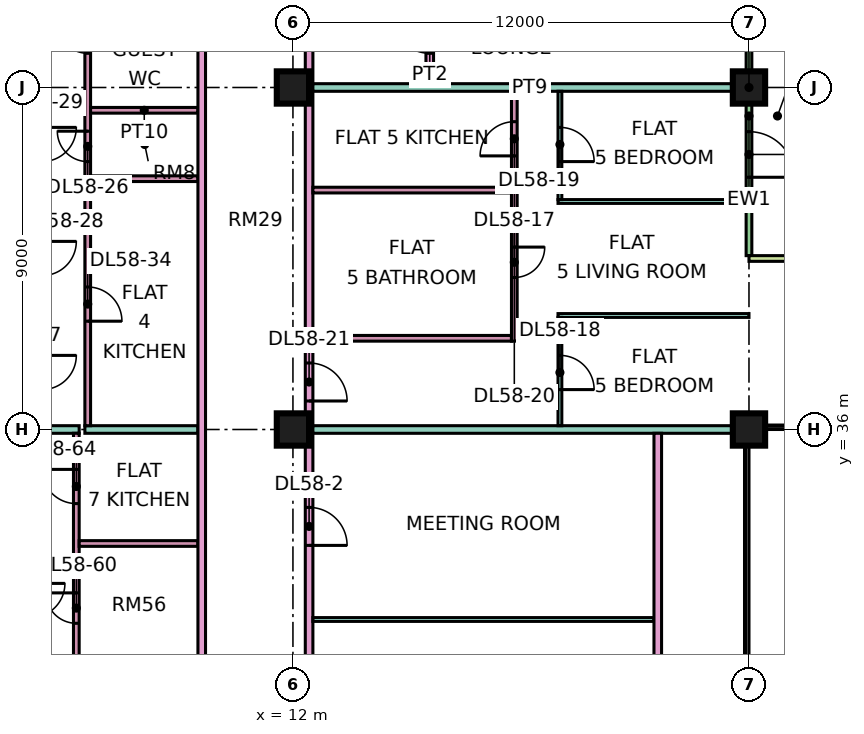
"""IFC4 building model, lengths in metres.
Left out: names, types, materials, properties, quantities, classifications, styles, units other than length and angle.
Written with IfcOpenShell. Run it as: python <this file> out.ifc"""

import sys

from ifc_helpers import new_model, si_unit, direction, frame, frame_2d, origin, origin_2d, place, context, subcontext, project, spatial, rectangle, extrude, element, fill, save


model = new_model("IFC4")
c1 = context("Model", 3, precision=1e-05, world=origin(), true_north=direction((0.0, 1.0)))
c2 = subcontext(c1, "Body", "Model", "MODEL_VIEW")
j1 = project(units=[si_unit("LENGTHUNIT", "METRE"), si_unit("PLANEANGLEUNIT", "RADIAN")], contexts=[c1])
p1 = place(None, origin())
s1 = spatial("IfcSite", under=j1, at=p1, CompositionType="ELEMENT")
p2 = place(p1, origin())
s2 = spatial("IfcBuilding", under=s1, at=p2, CompositionType="ELEMENT")
p3 = place(p2, frame((0.0, 0.0, 245.4)))
s3 = spatial("IfcBuildingStorey", under=s2, at=p3, CompositionType="ELEMENT", Elevation=245.4)
for number, where, z_axis, x_axis in (
    (1, (12.0, 36.0, 0.0), (0.0, 0.0, 1.0), (1.0, 0.0, 0.0)),
    (2, (12.0, 45.0, 0.0), (0.0, 0.0, 1.0), (1.0, 0.0, 0.0)),
    (3, (24.0, 36.0, 0.0), (0.0, 0.0, 1.0), (1.0, 0.0, 0.0)),
    (4, (24.0, 45.0, 0.0), (0.0, 0.0, 1.0), (1.0, 0.0, 0.0)),
):
    element("IfcColumn", number, at=place(p3, frame(where, z_axis=z_axis, x_axis=x_axis)), inside=s3, PredefinedType="COLUMN", context=c2, shape_type="SweptSolid", body=[
        extrude(rectangle(XDim=0.85, YDim=0.85, at=origin_2d()), origin(), (0.0, 0.0, 1.0), 3.75),
    ])
p4 = place(p3, frame((24.0, 40.575, 0.0), z_axis=(0.0, 0.0, 1.0), x_axis=(0.0, 1.0, 0.0)))
e5 = element("IfcWall", 5, at=p4, inside=s3, PredefinedType="SOLIDWALL", context=c2, shape_type="SweptSolid", body=[
    extrude(rectangle(XDim=7.35, YDim=0.15, at=frame_2d((3.675, 0.0))), origin(), (0.0, 0.0, 1.0), 3.35),
])
p5 = place(p4, frame((2.062, 0.0, 0.0)))
e6 = element("IfcOpeningElement", 6, at=p5, cuts=e5, PredefinedType="OPENING", context=c2, shape_type="SweptSolid", body=[
    extrude(rectangle(XDim=1.2, YDim=2.4, at=frame_2d((0.6, 1.2))), frame((0.0, 0.085, 0.0), z_axis=(0.0, -1.0, 0.0), x_axis=(1.0, 0.0, 0.0)), (0.0, 0.0, 1.0), 0.17),
])
p6 = place(p4, frame((5.55, 0.0, 0.45)))
e7 = element("IfcOpeningElement", 7, at=p6, cuts=e5, PredefinedType="OPENING", context=c2, shape_type="SweptSolid", body=[
    extrude(rectangle(XDim=1.2, YDim=2.4, at=frame_2d((0.6, 1.2))), frame((0.0, 0.085, 0.0), z_axis=(0.0, -1.0, 0.0), x_axis=(1.0, 0.0, 0.0)), (0.0, 0.0, 1.0), 0.17),
])
p7 = place(p3, frame((25.5, 40.5, 0.0), z_axis=(0.0, 0.0, 1.0), x_axis=(-1.0, 0.0, 0.0)))
e8 = element("IfcWall", 8, at=p7, inside=s3, PredefinedType="SOLIDWALL", context=c2, shape_type="SweptSolid", body=[
    extrude(rectangle(XDim=1.5, YDim=0.15, at=frame_2d((0.75, 0.0))), origin(), (0.0, 0.0, 1.0), 3.35),
])
p8 = place(p3, frame((0.0, 36.0, 0.0), z_axis=(0.0, 0.0, 1.0), x_axis=(1.0, 0.0, 0.0)))
e9 = element("IfcWall", 9, at=p8, inside=s3, PredefinedType="PARTITIONING", context=c2, shape_type="SweptSolid", body=[
    extrude(rectangle(XDim=6.375, YDim=0.2, at=frame_2d((3.188, 0.0))), origin(), (0.0, 0.0, 1.0), 3.35),
])
p9 = place(p3, frame((6.3, 26.325, 0.0), z_axis=(0.0, 0.0, 1.0), x_axis=(0.0, 1.0, 0.0)))
e10 = element("IfcWall", 10, at=p9, inside=s3, PredefinedType="PARTITIONING", context=c2, shape_type="SweptSolid", body=[
    extrude(rectangle(XDim=9.575, YDim=0.15, at=frame_2d((4.788, 0.0))), origin(), (0.0, 0.0, 1.0), 3.35),
])
p10 = place(p9, frame((4.575, 0.0, 0.0)))
e11 = element("IfcOpeningElement", 11, at=p10, cuts=e10, PredefinedType="OPENING", context=c2, shape_type="SweptSolid", body=[
    extrude(rectangle(XDim=0.8, YDim=2.1, at=frame_2d((0.4, 1.05))), frame((0.0, 0.085, 0.0), z_axis=(0.0, -1.0, 0.0), x_axis=(1.0, 0.0, 0.0)), (0.0, 0.0, 1.0), 0.17),
])
p11 = place(p9, frame((7.725, 0.0, 0.0)))
e12 = element("IfcOpeningElement", 12, at=p11, cuts=e10, PredefinedType="OPENING", context=c2, shape_type="SweptSolid", body=[
    extrude(rectangle(XDim=0.9, YDim=2.1, at=frame_2d((0.45, 1.05))), frame((0.0, 0.085, 0.0), z_axis=(0.0, -1.0, 0.0), x_axis=(1.0, 0.0, 0.0)), (0.0, 0.0, 1.0), 0.17),
])
p12 = place(p3, frame((6.375, 33.0, 0.0), z_axis=(0.0, 0.0, 1.0), x_axis=(1.0, 0.0, 0.0)))
e13 = element("IfcWall", 13, at=p12, inside=s3, PredefinedType="PARTITIONING", context=c2, shape_type="SweptSolid", body=[
    extrude(rectangle(XDim=3.125, YDim=0.15, at=frame_2d((1.562, 0.0))), origin(), (0.0, 0.0, 1.0), 3.35),
])
p13 = place(p3, frame((6.525, 36.0, 0.0), z_axis=(0.0, 0.0, 1.0), x_axis=(1.0, 0.0, 0.0)))
e14 = element("IfcWall", 14, at=p13, inside=s3, PredefinedType="PARTITIONING", context=c2, shape_type="SweptSolid", body=[
    extrude(rectangle(XDim=2.975, YDim=0.2, at=frame_2d((1.488, 0.0))), origin(), (0.0, 0.0, 1.0), 3.35),
])
p14 = place(p3, frame((6.6, 36.1, 0.0), z_axis=(0.0, 0.0, 1.0), x_axis=(0.0, 1.0, 0.0)))
e15 = element("IfcWall", 15, at=p14, inside=s3, PredefinedType="PARTITIONING", context=c2, shape_type="SweptSolid", body=[
    extrude(rectangle(XDim=12.275, YDim=0.15, at=frame_2d((6.137, 0.0))), origin(), (0.0, 0.0, 1.0), 3.35),
])
p15 = place(p14, frame((6.95, 0.0, 0.0)))
e16 = element("IfcOpeningElement", 16, at=p15, cuts=e15, PredefinedType="OPENING", context=c2, shape_type="SweptSolid", body=[
    extrude(rectangle(XDim=0.8, YDim=2.1, at=frame_2d((0.4, 1.05))), frame((0.0, 0.085, 0.0), z_axis=(0.0, -1.0, 0.0), x_axis=(1.0, 0.0, 0.0)), (0.0, 0.0, 1.0), 0.17),
])
p16 = place(p14, frame((2.75, 0.0, 0.0)))
e17 = element("IfcOpeningElement", 17, at=p16, cuts=e15, PredefinedType="OPENING", context=c2, shape_type="SweptSolid", body=[
    extrude(rectangle(XDim=0.9, YDim=2.1, at=frame_2d((0.45, 1.05))), frame((0.0, 0.085, 0.0), z_axis=(0.0, -1.0, 0.0), x_axis=(1.0, 0.0, 0.0)), (0.0, 0.0, 1.0), 0.17),
])
p17 = place(p14, frame((9.8, 0.0, 0.0)))
e18 = element("IfcOpeningElement", 18, at=p17, cuts=e15, PredefinedType="OPENING", context=c2, shape_type="SweptSolid", body=[
    extrude(rectangle(XDim=0.8, YDim=2.1, at=frame_2d((0.4, 1.05))), frame((0.0, 0.085, 0.0), z_axis=(0.0, -1.0, 0.0), x_axis=(1.0, 0.0, 0.0)), (0.0, 0.0, 1.0), 0.17),
])
for number, where, z_axis, x_axis in (
    (19, (6.675, 42.6, 0.0), (0.0, 0.0, 1.0), (1.0, 0.0, 0.0)),
    (20, (6.675, 44.4, 0.0), (0.0, 0.0, 1.0), (1.0, 0.0, 0.0)),
):
    element("IfcWall", number, at=place(p3, frame(where, z_axis=z_axis, x_axis=x_axis)), inside=s3, PredefinedType="PARTITIONING", context=c2, shape_type="SweptSolid", body=[
        extrude(rectangle(XDim=2.825, YDim=0.15, at=frame_2d((1.413, 0.0))), origin(), (0.0, 0.0, 1.0), 3.35),
    ])
p18 = place(p3, frame((9.6, 20.0, 0.0), z_axis=(0.0, 0.0, 1.0), x_axis=(0.0, 1.0, 0.0)))
e21 = element("IfcWall", 21, at=p18, inside=s3, PredefinedType="PARTITIONING", context=c2, shape_type="SweptSolid", body=[
    extrude(rectangle(XDim=44.35, YDim=0.2, at=frame_2d((22.175, 0.0))), origin(), (0.0, 0.0, 1.0), 3.35),
])
p19 = place(p18, frame((28.8, 0.0, 0.0)))
e22 = element("IfcOpeningElement", 22, at=p19, cuts=e21, PredefinedType="OPENING", context=c2, shape_type="SweptSolid", body=[
    extrude(rectangle(XDim=1.0, YDim=2.1, at=frame_2d((0.5, 1.05))), frame((0.0, 0.11, 0.0), z_axis=(0.0, -1.0, 0.0), x_axis=(1.0, 0.0, 0.0)), (0.0, 0.0, 1.0), 0.22),
])
p20 = place(p18, frame((0.6, 0.0, 0.0)))
e23 = element("IfcOpeningElement", 23, at=p20, cuts=e21, PredefinedType="OPENING", context=c2, shape_type="SweptSolid", body=[
    extrude(rectangle(XDim=1.2, YDim=2.1, at=frame_2d((0.6, 1.05))), frame((0.0, 0.11, 0.0), z_axis=(0.0, -1.0, 0.0), x_axis=(1.0, 0.0, 0.0)), (0.0, 0.0, 1.0), 0.22),
])
p21 = place(p18, frame((3.9, 0.0, 0.0)))
e24 = element("IfcOpeningElement", 24, at=p21, cuts=e21, PredefinedType="OPENING", context=c2, shape_type="SweptSolid", body=[
    extrude(rectangle(XDim=1.0, YDim=2.1, at=frame_2d((0.5, 1.05))), frame((0.0, 0.11, 0.0), z_axis=(0.0, -1.0, 0.0), x_axis=(1.0, 0.0, 0.0)), (0.0, 0.0, 1.0), 0.22),
])
p22 = place(p3, frame((12.425, 20.0, 0.0), z_axis=(0.0, 0.0, 1.0), x_axis=(0.0, 1.0, 0.0)))
e25 = element("IfcWall", 25, at=p22, inside=s3, PredefinedType="PARTITIONING", context=c2, shape_type="SweptSolid", body=[
    extrude(rectangle(XDim=42.926, YDim=0.2, at=frame_2d((21.463, 0.0))), origin(), (0.0, 0.0, 1.0), 3.35),
])
p23 = place(p22, frame((7.0, 0.0, 0.0)))
e26 = element("IfcOpeningElement", 26, at=p23, cuts=e25, PredefinedType="OPENING", context=c2, shape_type="SweptSolid", body=[
    extrude(rectangle(XDim=1.0, YDim=2.1, at=frame_2d((0.5, 1.05))), frame((0.0, 0.11, 0.0), z_axis=(0.0, -1.0, 0.0), x_axis=(1.0, 0.0, 0.0)), (0.0, 0.0, 1.0), 0.22),
])
p24 = place(p22, frame((12.95, 0.0, 0.0)))
e27 = element("IfcOpeningElement", 27, at=p24, cuts=e25, PredefinedType="OPENING", context=c2, shape_type="SweptSolid", body=[
    extrude(rectangle(XDim=1.0, YDim=2.1, at=frame_2d((0.5, 1.05))), frame((0.0, 0.11, 0.0), z_axis=(0.0, -1.0, 0.0), x_axis=(1.0, 0.0, 0.0)), (0.0, 0.0, 1.0), 0.22),
])
p25 = place(p22, frame((16.75, 0.0, 0.0)))
e28 = element("IfcOpeningElement", 28, at=p25, cuts=e25, PredefinedType="OPENING", context=c2, shape_type="SweptSolid", body=[
    extrude(rectangle(XDim=1.0, YDim=2.1, at=frame_2d((0.5, 1.05))), frame((0.0, 0.11, 0.0), z_axis=(0.0, -1.0, 0.0), x_axis=(1.0, 0.0, 0.0)), (0.0, 0.0, 1.0), 0.22),
])
p26 = place(p22, frame((34.9, 0.0, 0.0)))
e29 = element("IfcOpeningElement", 29, at=p26, cuts=e25, PredefinedType="OPENING", context=c2, shape_type="SweptSolid", body=[
    extrude(rectangle(XDim=1.0, YDim=2.1, at=frame_2d((0.5, 1.05))), frame((0.0, 0.11, 0.0), z_axis=(0.0, -1.0, 0.0), x_axis=(1.0, 0.0, 0.0)), (0.0, 0.0, 1.0), 0.22),
])
p27 = place(p22, frame((1.15, 0.0, 0.0)))
e30 = element("IfcOpeningElement", 30, at=p27, cuts=e25, PredefinedType="OPENING", context=c2, shape_type="SweptSolid", body=[
    extrude(rectangle(XDim=1.8, YDim=2.1, at=frame_2d((0.9, 1.05))), frame((0.0, 0.11, 0.0), z_axis=(0.0, -1.0, 0.0), x_axis=(1.0, 0.0, 0.0)), (0.0, 0.0, 1.0), 0.22),
])
p28 = place(p22, frame((28.6, 0.0, 0.0)))
e31 = element("IfcOpeningElement", 31, at=p28, cuts=e25, PredefinedType="OPENING", context=c2, shape_type="SweptSolid", body=[
    extrude(rectangle(XDim=1.8, YDim=2.1, at=frame_2d((0.9, 1.05))), frame((0.0, 0.11, 0.0), z_axis=(0.0, -1.0, 0.0), x_axis=(1.0, 0.0, 0.0)), (0.0, 0.0, 1.0), 0.22),
])
p29 = place(p3, frame((12.525, 31.0, 0.0), z_axis=(0.0, 0.0, 1.0), x_axis=(1.0, 0.0, 0.0)))
e32 = element("IfcWall", 32, at=p29, inside=s3, PredefinedType="PARTITIONING", context=c2, shape_type="SweptSolid", body=[
    extrude(rectangle(XDim=8.975, YDim=0.1, at=frame_2d((4.488, 0.0))), origin(), (0.0, 0.0, 1.0), 3.35),
])
p30 = place(p3, frame((12.525, 36.0, 0.0), z_axis=(0.0, 0.0, 1.0), x_axis=(1.0, 0.0, 0.0)))
e33 = element("IfcWall", 33, at=p30, inside=s3, PredefinedType="PARTITIONING", context=c2, shape_type="SweptSolid", body=[
    extrude(rectangle(XDim=11.475, YDim=0.2, at=frame_2d((5.738, 0.0))), origin(), (0.0, 0.0, 1.0), 3.35),
])
for number, where, z_axis, x_axis in (
    (34, (12.525, 38.4, 0.0), (0.0, 0.0, 1.0), (1.0, 0.0, 0.0)),
    (35, (12.525, 42.3, 0.0), (0.0, 0.0, 1.0), (1.0, 0.0, 0.0)),
):
    element("IfcWall", number, at=place(p3, frame(where, z_axis=z_axis, x_axis=x_axis)), inside=s3, PredefinedType="PARTITIONING", context=c2, shape_type="SweptSolid", body=[
        extrude(rectangle(XDim=5.225, YDim=0.15, at=frame_2d((2.613, 0.0))), origin(), (0.0, 0.0, 1.0), 3.35),
    ])
p31 = place(p3, frame((12.525, 45.0, 0.0), z_axis=(0.0, 0.0, 1.0), x_axis=(1.0, 0.0, 0.0)))
e36 = element("IfcWall", 36, at=p31, inside=s3, PredefinedType="PARTITIONING", context=c2, shape_type="SweptSolid", body=[
    extrude(rectangle(XDim=11.401, YDim=0.2, at=frame_2d((5.701, 0.0))), origin(), (0.0, 0.0, 1.0), 3.35),
])
p32 = place(p3, frame((15.6, 45.1, 0.0), z_axis=(0.0, 0.0, 1.0), x_axis=(0.0, 1.0, 0.0)))
e37 = element("IfcWall", 37, at=p32, inside=s3, PredefinedType="PARTITIONING", context=c2, shape_type="SweptSolid", body=[
    extrude(rectangle(XDim=2.675, YDim=0.2, at=frame_2d((1.337, 0.0))), origin(), (0.0, 0.0, 1.0), 3.35),
])
p33 = place(p32, frame((0.8, 0.0, 0.0)))
e38 = element("IfcOpeningElement", 38, at=p33, cuts=e37, PredefinedType="OPENING", context=c2, shape_type="SweptSolid", body=[
    extrude(rectangle(XDim=1.0, YDim=2.1, at=frame_2d((0.5, 1.05))), frame((0.0, 0.11, 0.0), z_axis=(0.0, -1.0, 0.0), x_axis=(1.0, 0.0, 0.0)), (0.0, 0.0, 1.0), 0.22),
])
p34 = place(p3, frame((17.825, 38.325, 0.0), z_axis=(0.0, 0.0, 1.0), x_axis=(0.0, 1.0, 0.0)))
e39 = element("IfcWall", 39, at=p34, inside=s3, PredefinedType="PARTITIONING", context=c2, shape_type="SweptSolid", body=[
    extrude(rectangle(XDim=6.575, YDim=0.15, at=frame_2d((3.288, 0.0))), origin(), (0.0, 0.0, 1.0), 3.35),
])
p35 = place(p34, frame((1.675, 0.0, 0.0)))
e40 = element("IfcOpeningElement", 40, at=p35, cuts=e39, PredefinedType="OPENING", context=c2, shape_type="SweptSolid", body=[
    extrude(rectangle(XDim=0.8, YDim=2.1, at=frame_2d((0.4, 1.05))), frame((0.0, 0.085, 0.0), z_axis=(0.0, -1.0, 0.0), x_axis=(1.0, 0.0, 0.0)), (0.0, 0.0, 1.0), 0.17),
])
p36 = place(p34, frame((4.875, 0.0, 0.0)))
e41 = element("IfcOpeningElement", 41, at=p36, cuts=e39, PredefinedType="OPENING", context=c2, shape_type="SweptSolid", body=[
    extrude(rectangle(XDim=0.9, YDim=2.1, at=frame_2d((0.45, 1.05))), frame((0.0, 0.085, 0.0), z_axis=(0.0, -1.0, 0.0), x_axis=(1.0, 0.0, 0.0)), (0.0, 0.0, 1.0), 0.17),
])
p37 = place(p3, frame((18.975, 39.0, 0.0), z_axis=(0.0, 0.0, 1.0), x_axis=(1.0, 0.0, 0.0)))
e42 = element("IfcWall", 42, at=p37, inside=s3, PredefinedType="PARTITIONING", context=c2, shape_type="SweptSolid", body=[
    extrude(rectangle(XDim=5.025, YDim=0.1, at=frame_2d((2.512, 0.0))), origin(), (0.0, 0.0, 1.0), 3.35),
])
p38 = place(p3, frame((18.975, 42.0, 0.0), z_axis=(0.0, 0.0, 1.0), x_axis=(1.0, 0.0, 0.0)))
e43 = element("IfcWall", 43, at=p38, inside=s3, PredefinedType="PARTITIONING", context=c2, shape_type="SweptSolid", body=[
    extrude(rectangle(XDim=4.951, YDim=0.1, at=frame_2d((2.476, 0.0))), origin(), (0.0, 0.0, 1.0), 3.35),
])
p39 = place(p3, frame((19.025, 36.1, 0.0), z_axis=(0.0, 0.0, 1.0), x_axis=(0.0, 1.0, 0.0)))
e44 = element("IfcWall", 44, at=p39, inside=s3, PredefinedType="PARTITIONING", context=c2, shape_type="SweptSolid", body=[
    extrude(rectangle(XDim=2.85, YDim=0.1, at=frame_2d((1.425, 0.0))), origin(), (0.0, 0.0, 1.0), 3.35),
])
p40 = place(p39, frame((0.95, 0.0, 0.0)))
e45 = element("IfcOpeningElement", 45, at=p40, cuts=e44, PredefinedType="OPENING", context=c2, shape_type="SweptSolid", body=[
    extrude(rectangle(XDim=0.9, YDim=2.1, at=frame_2d((0.45, 1.05))), frame((0.0, 0.06, 0.0), z_axis=(0.0, -1.0, 0.0), x_axis=(1.0, 0.0, 0.0)), (0.0, 0.0, 1.0), 0.12),
])
p41 = place(p3, frame((19.025, 42.05, 0.0), z_axis=(0.0, 0.0, 1.0), x_axis=(0.0, 1.0, 0.0)))
e46 = element("IfcWall", 46, at=p41, inside=s3, PredefinedType="PARTITIONING", context=c2, shape_type="SweptSolid", body=[
    extrude(rectangle(XDim=2.85, YDim=0.1, at=frame_2d((1.425, 0.0))), origin(), (0.0, 0.0, 1.0), 3.35),
])
p42 = place(p41, frame((1.0, 0.0, 0.0)))
e47 = element("IfcOpeningElement", 47, at=p42, cuts=e46, PredefinedType="OPENING", context=c2, shape_type="SweptSolid", body=[
    extrude(rectangle(XDim=0.9, YDim=2.1, at=frame_2d((0.45, 1.05))), frame((0.0, 0.06, 0.0), z_axis=(0.0, -1.0, 0.0), x_axis=(1.0, 0.0, 0.0)), (0.0, 0.0, 1.0), 0.12),
])
p43 = place(p3, frame((21.6, 23.9, 0.0), z_axis=(0.0, 0.0, 1.0), x_axis=(0.0, 1.0, 0.0)))
e48 = element("IfcWall", 48, at=p43, inside=s3, PredefinedType="PARTITIONING", context=c2, shape_type="SweptSolid", body=[
    extrude(rectangle(XDim=12.0, YDim=0.2, at=frame_2d((6.0, 0.0))), origin(), (0.0, 0.0, 1.0), 3.35),
])
p44 = place(p5, frame((1.2, 0.0, 0.0), z_axis=(0.0, 0.0, 1.0), x_axis=(-1.0, 0.0, 0.0)))
e49 = element("IfcDoor", 49, at=p44, inside=s3, OperationType="DOUBLE_DOOR_SINGLE_SWING", PredefinedType="DOOR", context=c2, shape_type="SweptSolid", body=[
    extrude(rectangle(XDim=1.2, YDim=2.4, at=frame_2d((0.6, 1.2))), frame((0.0, 0.025, 0.0), z_axis=(0.0, -1.0, 0.0), x_axis=(1.0, 0.0, 0.0)), (0.0, 0.0, 1.0), 0.05),
])
fill(e6, e49)
p45 = place(p24, frame((1.0, 0.0, 0.0), z_axis=(0.0, 0.0, 1.0), x_axis=(-1.0, 0.0, 0.0)))
e50 = element("IfcDoor", 50, at=p45, inside=s3, OperationType="SINGLE_SWING_LEFT", PredefinedType="DOOR", context=c2, shape_type="SweptSolid", body=[
    extrude(rectangle(XDim=1.0, YDim=2.1, at=frame_2d((0.5, 1.05))), frame((0.0, 0.025, 0.0), z_axis=(0.0, -1.0, 0.0), x_axis=(1.0, 0.0, 0.0)), (0.0, 0.0, 1.0), 0.05),
])
fill(e27, e50)
p46 = place(p35, origin())
e51 = element("IfcDoor", 51, at=p46, inside=s3, OperationType="SINGLE_SWING_RIGHT", PredefinedType="DOOR", context=c2, shape_type="SweptSolid", body=[
    extrude(rectangle(XDim=0.8, YDim=2.1, at=frame_2d((0.4, 1.05))), frame((0.0, 0.025, 0.0), z_axis=(0.0, -1.0, 0.0), x_axis=(1.0, 0.0, 0.0)), (0.0, 0.0, 1.0), 0.05),
])
fill(e40, e51)
p47 = place(p40, frame((0.9, 0.0, 0.0), z_axis=(0.0, 0.0, 1.0), x_axis=(-1.0, 0.0, 0.0)))
e52 = element("IfcDoor", 52, at=p47, inside=s3, OperationType="SINGLE_SWING_LEFT", PredefinedType="DOOR", context=c2, shape_type="SweptSolid", body=[
    extrude(rectangle(XDim=0.9, YDim=2.1, at=frame_2d((0.45, 1.05))), frame((0.0, 0.025, 0.0), z_axis=(0.0, -1.0, 0.0), x_axis=(1.0, 0.0, 0.0)), (0.0, 0.0, 1.0), 0.05),
])
fill(e45, e52)
p48 = place(p42, frame((0.9, 0.0, 0.0), z_axis=(0.0, 0.0, 1.0), x_axis=(-1.0, 0.0, 0.0)))
e53 = element("IfcDoor", 53, at=p48, inside=s3, OperationType="SINGLE_SWING_LEFT", PredefinedType="DOOR", context=c2, shape_type="SweptSolid", body=[
    extrude(rectangle(XDim=0.9, YDim=2.1, at=frame_2d((0.45, 1.05))), frame((0.0, 0.025, 0.0), z_axis=(0.0, -1.0, 0.0), x_axis=(1.0, 0.0, 0.0)), (0.0, 0.0, 1.0), 0.05),
])
fill(e47, e53)
p49 = place(p36, origin())
e54 = element("IfcDoor", 54, at=p49, inside=s3, OperationType="SINGLE_SWING_LEFT", PredefinedType="DOOR", context=c2, shape_type="SweptSolid", body=[
    extrude(rectangle(XDim=0.9, YDim=2.1, at=frame_2d((0.45, 1.05))), frame((0.0, 0.025, 0.0), z_axis=(0.0, -1.0, 0.0), x_axis=(1.0, 0.0, 0.0)), (0.0, 0.0, 1.0), 0.05),
])
fill(e41, e54)
p50 = place(p25, frame((1.0, 0.0, 0.0), z_axis=(0.0, 0.0, 1.0), x_axis=(-1.0, 0.0, 0.0)))
e55 = element("IfcDoor", 55, at=p50, inside=s3, OperationType="SINGLE_SWING_LEFT", PredefinedType="DOOR", context=c2, shape_type="SweptSolid", body=[
    extrude(rectangle(XDim=1.0, YDim=2.1, at=frame_2d((0.5, 1.05))), frame((0.0, 0.025, 0.0), z_axis=(0.0, -1.0, 0.0), x_axis=(1.0, 0.0, 0.0)), (0.0, 0.0, 1.0), 0.05),
])
fill(e28, e55)
p51 = place(p15, frame((0.8, 0.0, 0.0), z_axis=(0.0, 0.0, 1.0), x_axis=(-1.0, 0.0, 0.0)))
e56 = element("IfcDoor", 56, at=p51, inside=s3, OperationType="SINGLE_SWING_RIGHT", PredefinedType="DOOR", context=c2, shape_type="SweptSolid", body=[
    extrude(rectangle(XDim=0.8, YDim=2.1, at=frame_2d((0.4, 1.05))), frame((0.0, 0.025, 0.0), z_axis=(0.0, -1.0, 0.0), x_axis=(1.0, 0.0, 0.0)), (0.0, 0.0, 1.0), 0.05),
])
fill(e16, e56)
p52 = place(p16, frame((0.9, 0.0, 0.0), z_axis=(0.0, 0.0, 1.0), x_axis=(-1.0, 0.0, 0.0)))
e57 = element("IfcDoor", 57, at=p52, inside=s3, OperationType="SINGLE_SWING_LEFT", PredefinedType="DOOR", context=c2, shape_type="SweptSolid", body=[
    extrude(rectangle(XDim=0.9, YDim=2.1, at=frame_2d((0.45, 1.05))), frame((0.0, 0.025, 0.0), z_axis=(0.0, -1.0, 0.0), x_axis=(1.0, 0.0, 0.0)), (0.0, 0.0, 1.0), 0.05),
])
fill(e17, e57)
p53 = place(p17, frame((0.8, 0.0, 0.0), z_axis=(0.0, 0.0, 1.0), x_axis=(-1.0, 0.0, 0.0)))
e58 = element("IfcDoor", 58, at=p53, inside=s3, OperationType="SINGLE_SWING_RIGHT", PredefinedType="DOOR", context=c2, shape_type="SweptSolid", body=[
    extrude(rectangle(XDim=0.8, YDim=2.1, at=frame_2d((0.4, 1.05))), frame((0.0, 0.025, 0.0), z_axis=(0.0, -1.0, 0.0), x_axis=(1.0, 0.0, 0.0)), (0.0, 0.0, 1.0), 0.05),
])
fill(e18, e58)
p54 = place(p33, frame((1.0, 0.0, 0.0), z_axis=(0.0, 0.0, 1.0), x_axis=(-1.0, 0.0, 0.0)))
e59 = element("IfcDoor", 59, at=p54, inside=s3, OperationType="SINGLE_SWING_RIGHT", PredefinedType="DOOR", context=c2, shape_type="SweptSolid", body=[
    extrude(rectangle(XDim=1.0, YDim=2.1, at=frame_2d((0.5, 1.05))), frame((0.0, 0.025, 0.0), z_axis=(0.0, -1.0, 0.0), x_axis=(1.0, 0.0, 0.0)), (0.0, 0.0, 1.0), 0.05),
])
fill(e38, e59)
p55 = place(p10, frame((0.8, 0.0, 0.0), z_axis=(0.0, 0.0, 1.0), x_axis=(-1.0, 0.0, 0.0)))
e60 = element("IfcDoor", 60, at=p55, inside=s3, OperationType="SINGLE_SWING_RIGHT", PredefinedType="DOOR", context=c2, shape_type="SweptSolid", body=[
    extrude(rectangle(XDim=0.8, YDim=2.1, at=frame_2d((0.4, 1.05))), frame((0.0, 0.025, 0.0), z_axis=(0.0, -1.0, 0.0), x_axis=(1.0, 0.0, 0.0)), (0.0, 0.0, 1.0), 0.05),
])
fill(e11, e60)
p56 = place(p11, frame((0.9, 0.0, 0.0), z_axis=(0.0, 0.0, 1.0), x_axis=(-1.0, 0.0, 0.0)))
e61 = element("IfcDoor", 61, at=p56, inside=s3, OperationType="SINGLE_SWING_RIGHT", PredefinedType="DOOR", context=c2, shape_type="SweptSolid", body=[
    extrude(rectangle(XDim=0.9, YDim=2.1, at=frame_2d((0.45, 1.05))), frame((0.0, 0.025, 0.0), z_axis=(0.0, -1.0, 0.0), x_axis=(1.0, 0.0, 0.0)), (0.0, 0.0, 1.0), 0.05),
])
fill(e12, e61)
save(model, sys.argv[1])
